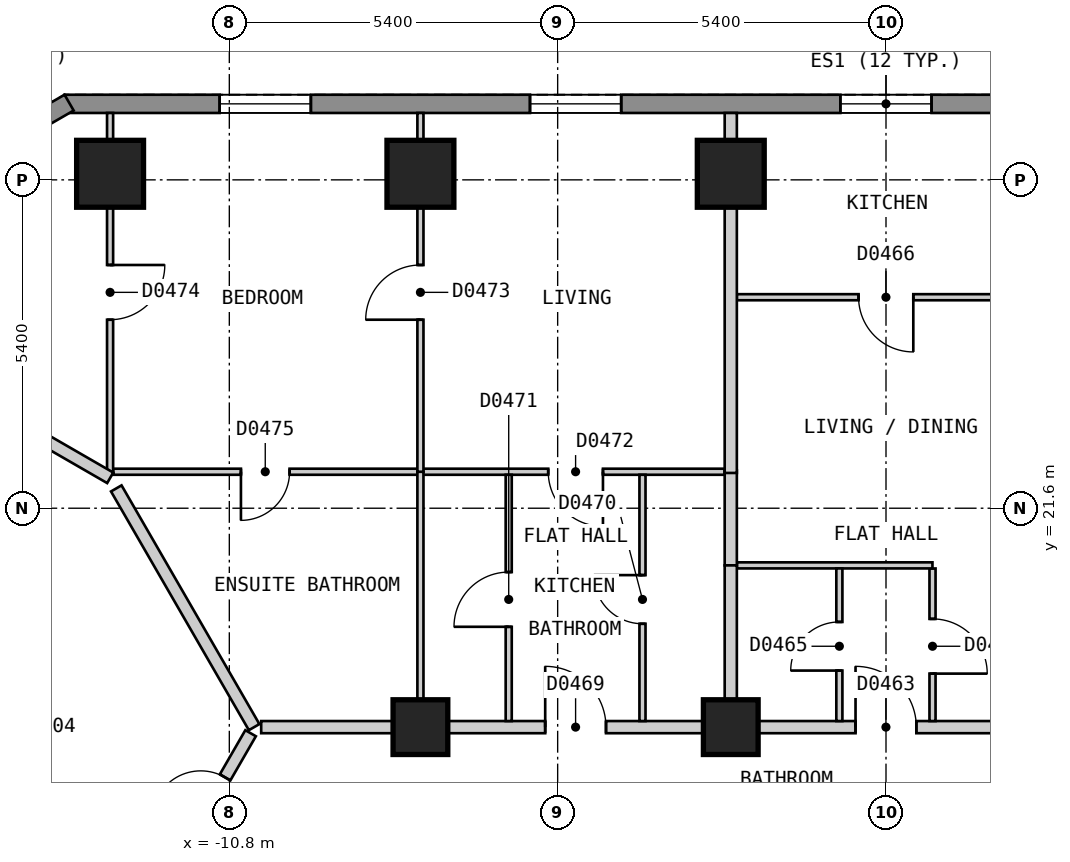
"""IFC4 building model, lengths in metres.
Left out: names, types, materials, properties, quantities, classifications, styles, units other than length and angle.
Written with IfcOpenShell. Run it as: python <this file> out.ifc"""

import sys

from ifc_helpers import new_model, si_unit, direction, frame, frame_2d, origin, origin_2d, place, context, subcontext, project, spatial, polyline, rectangle, outline, extrude, element, fill, save


model = new_model("IFC4")
c1 = context("Model", 3, precision=1e-05, world=origin(), true_north=direction((0.0, 1.0)))
c2 = subcontext(c1, "Body", "Model", "MODEL_VIEW")
j1 = project(units=[si_unit("LENGTHUNIT", "METRE"), si_unit("PLANEANGLEUNIT", "RADIAN")], contexts=[c1])
p1 = place(None, origin())
s1 = spatial("IfcSite", under=j1, at=p1, CompositionType="ELEMENT")
p2 = place(p1, origin())
s2 = spatial("IfcBuilding", under=s1, at=p2, CompositionType="ELEMENT")
p3 = place(p2, frame((0.0, 0.0, 32.4)))
s3 = spatial("IfcBuildingStorey", under=s2, at=p3, CompositionType="ELEMENT", Elevation=32.4)
for number, where, z_axis, x_axis in (
    (1, (-2.553, 27.1, 0.0), (0.0, 0.0, 1.0), (-1.0, 0.0, 0.0)),
    (2, (-7.657, 27.1, 0.0), (0.0, 0.0, 1.0), (-1.0, 0.0, 0.0)),
    (3, (-12.761, 27.1, 0.0), (0.0, 0.0, 1.0), (-1.0, 0.0, 0.0)),
):
    element("IfcColumn", number, at=place(p3, frame(where, z_axis=z_axis, x_axis=x_axis)), inside=s3, PredefinedType="COLUMN", context=c2, shape_type="SweptSolid", body=[
        extrude(rectangle(XDim=1.1, YDim=1.1, at=origin_2d()), origin(), (0.0, 0.0, 1.0), 3.0),
    ])
for number, where, z_axis, x_axis in (
    (4, (-2.553, 18.0, 0.0), (0.0, 0.0, 1.0), (-1.0, 0.0, 0.0)),
    (5, (-7.657, 18.0, 0.0), (0.0, 0.0, 1.0), (-1.0, 0.0, 0.0)),
):
    element("IfcColumn", number, at=place(p3, frame(where, z_axis=z_axis, x_axis=x_axis)), inside=s3, PredefinedType="COLUMN", context=c2, shape_type="SweptSolid", body=[
        extrude(rectangle(XDim=0.9, YDim=0.9, at=origin_2d()), origin(), (0.0, 0.0, 1.0), 3.0),
    ])
p4 = place(p3, frame((13.51, 28.25, 0.0), z_axis=(0.0, 0.0, 1.0), x_axis=(-1.0, 0.0, 0.0)))
e6 = element("IfcWall", 6, at=p4, inside=s3, PredefinedType="SOLIDWALL", context=c2, shape_type="SweptSolid", body=[
    extrude(outline(polyline([(0.0, -0.15), (27.02, -0.15), (26.94, 0.15), (0.08, 0.15), (0.0, -0.15)])), origin(), (0.0, 0.0, 1.0), 2.7),
])
p5 = place(p4, frame((2.553, 0.0, 0.15)))
e7 = element("IfcOpeningElement", 7, at=p5, cuts=e6, PredefinedType="OPENING", context=c2, shape_type="SweptSolid", body=[
    extrude(rectangle(XDim=1.5, YDim=2.1, at=frame_2d((0.75, 1.05))), frame((0.0, 0.16, 0.0), z_axis=(0.0, -1.0, 0.0), x_axis=(1.0, 0.0, 0.0)), (0.0, 0.0, 1.0), 0.32),
])
p6 = place(p4, frame((7.657, 0.0, 0.15)))
e8 = element("IfcOpeningElement", 8, at=p6, cuts=e6, PredefinedType="OPENING", context=c2, shape_type="SweptSolid", body=[
    extrude(rectangle(XDim=1.5, YDim=2.1, at=frame_2d((0.75, 1.05))), frame((0.0, 0.16, 0.0), z_axis=(0.0, -1.0, 0.0), x_axis=(1.0, 0.0, 0.0)), (0.0, 0.0, 1.0), 0.32),
])
p7 = place(p4, frame((12.761, 0.0, 0.15)))
e9 = element("IfcOpeningElement", 9, at=p7, cuts=e6, PredefinedType="OPENING", context=c2, shape_type="SweptSolid", body=[
    extrude(rectangle(XDim=1.5, YDim=2.1, at=frame_2d((0.75, 1.05))), frame((0.0, 0.16, 0.0), z_axis=(0.0, -1.0, 0.0), x_axis=(1.0, 0.0, 0.0)), (0.0, 0.0, 1.0), 0.32),
])
p8 = place(p4, frame((17.865, 0.0, 0.15)))
e10 = element("IfcOpeningElement", 10, at=p8, cuts=e6, PredefinedType="OPENING", context=c2, shape_type="SweptSolid", body=[
    extrude(rectangle(XDim=1.5, YDim=2.1, at=frame_2d((0.75, 1.05))), frame((0.0, 0.16, 0.0), z_axis=(0.0, -1.0, 0.0), x_axis=(1.0, 0.0, 0.0)), (0.0, 0.0, 1.0), 0.32),
])
p9 = place(p4, frame((22.969, 0.0, 0.15)))
e11 = element("IfcOpeningElement", 11, at=p9, cuts=e6, PredefinedType="OPENING", context=c2, shape_type="SweptSolid", body=[
    extrude(rectangle(XDim=1.5, YDim=2.1, at=frame_2d((0.75, 1.05))), frame((0.0, 0.16, 0.0), z_axis=(0.0, -1.0, 0.0), x_axis=(1.0, 0.0, 0.0)), (0.0, 0.0, 1.0), 0.32),
])
p10 = place(p3, frame((-13.435, 28.27, 0.0), z_axis=(0.0, 0.0, 1.0), x_axis=(-0.866010750942, -0.50002537861, 0.0)))
e12 = element("IfcWall", 12, at=p10, inside=s3, PredefinedType="SOLIDWALL", context=c2, shape_type="SweptSolid", body=[
    extrude(outline(polyline([(0.0, -0.15), (5.0, -0.15), (4.919, 0.15), (0.08, 0.15), (0.0, -0.15)])), origin(), (0.0, 0.0, 1.0), 2.7),
])
p11 = place(p10, frame((0.65, 0.0, 0.15)))
e13 = element("IfcOpeningElement", 13, at=p11, cuts=e12, PredefinedType="OPENING", context=c2, shape_type="SweptSolid", body=[
    extrude(rectangle(XDim=1.2, YDim=2.1, at=frame_2d((0.6, 1.05))), frame((0.0, 0.16, 0.0), z_axis=(0.0, -1.0, 0.0), x_axis=(1.0, 0.0, 0.0)), (0.0, 0.0, 1.0), 0.32),
])
p12 = place(p3, frame((-10.276, 18.0, 0.0), z_axis=(0.0, 0.0, 1.0), x_axis=(1.0, 0.0, 0.0)))
e14 = element("IfcWall", 14, at=p12, inside=s3, PredefinedType="PARTITIONING", context=c2, shape_type="SweptSolid", body=[
    extrude(rectangle(XDim=20.5, YDim=0.2, at=frame_2d((10.25, 0.0))), origin(), (0.0, 0.0, 1.0), 2.7),
])
p13 = place(p12, frame((19.265, 0.0, 0.0)))
e15 = element("IfcOpeningElement", 15, at=p13, cuts=e14, PredefinedType="OPENING", context=c2, shape_type="SweptSolid", body=[
    extrude(rectangle(XDim=1.0, YDim=2.1, at=frame_2d((0.5, 1.05))), frame((0.0, 0.11, 0.0), z_axis=(0.0, -1.0, 0.0), x_axis=(1.0, 0.0, 0.0)), (0.0, 0.0, 1.0), 0.22),
])
p14 = place(p12, frame((9.775, 0.0, 0.0)))
e16 = element("IfcOpeningElement", 16, at=p14, cuts=e14, PredefinedType="OPENING", context=c2, shape_type="SweptSolid", body=[
    extrude(rectangle(XDim=1.0, YDim=2.1, at=frame_2d((0.5, 1.05))), frame((0.0, 0.11, 0.0), z_axis=(0.0, -1.0, 0.0), x_axis=(1.0, 0.0, 0.0)), (0.0, 0.0, 1.0), 0.22),
])
p15 = place(p12, frame((4.671, 0.0, 0.0)))
e17 = element("IfcOpeningElement", 17, at=p15, cuts=e14, PredefinedType="OPENING", context=c2, shape_type="SweptSolid", body=[
    extrude(rectangle(XDim=1.0, YDim=2.1, at=frame_2d((0.5, 1.05))), frame((0.0, 0.11, 0.0), z_axis=(0.0, -1.0, 0.0), x_axis=(1.0, 0.0, 0.0)), (0.0, 0.0, 1.0), 0.22),
])
p16 = place(p3, frame((-20.727, 0.099, 0.0), z_axis=(0.0, 0.0, 1.0), x_axis=(0.499993204491, 0.866029327138, 0.0)))
e18 = element("IfcWall", 18, at=p16, inside=s3, PredefinedType="PARTITIONING", context=c2, shape_type="SweptSolid", body=[
    extrude(rectangle(XDim=20.554, YDim=0.2, at=frame_2d((10.277, 0.0))), origin(), (0.0, 0.0, 1.0), 2.7),
])
p17 = place(p16, frame((18.916, 0.0, 0.0)))
e19 = element("IfcOpeningElement", 19, at=p17, cuts=e18, PredefinedType="OPENING", context=c2, shape_type="SweptSolid", body=[
    extrude(rectangle(XDim=0.8, YDim=2.1, at=frame_2d((0.4, 1.05))), frame((0.0, 0.11, 0.0), z_axis=(0.0, -1.0, 0.0), x_axis=(1.0, 0.0, 0.0)), (0.0, 0.0, 1.0), 0.22),
])
p18 = place(p16, frame((14.88, 0.0, 0.0)))
e20 = element("IfcOpeningElement", 20, at=p18, cuts=e18, PredefinedType="OPENING", context=c2, shape_type="SweptSolid", body=[
    extrude(rectangle(XDim=1.0, YDim=2.1, at=frame_2d((0.5, 1.05))), frame((0.0, 0.11, 0.0), z_axis=(0.0, -1.0, 0.0), x_axis=(1.0, 0.0, 0.0)), (0.0, 0.0, 1.0), 0.22),
])
p19 = place(p16, frame((9.776, 0.0, 0.0)))
e21 = element("IfcOpeningElement", 21, at=p19, cuts=e18, PredefinedType="OPENING", context=c2, shape_type="SweptSolid", body=[
    extrude(rectangle(XDim=1.0, YDim=2.1, at=frame_2d((0.5, 1.05))), frame((0.0, 0.11, 0.0), z_axis=(0.0, -1.0, 0.0), x_axis=(1.0, 0.0, 0.0)), (0.0, 0.0, 1.0), 0.22),
])
p20 = place(p16, frame((4.673, 0.0, 0.0)))
e22 = element("IfcOpeningElement", 22, at=p20, cuts=e18, PredefinedType="OPENING", context=c2, shape_type="SweptSolid", body=[
    extrude(rectangle(XDim=1.0, YDim=2.1, at=frame_2d((0.5, 1.05))), frame((0.0, 0.11, 0.0), z_axis=(0.0, -1.0, 0.0), x_axis=(1.0, 0.0, 0.0)), (0.0, 0.0, 1.0), 0.22),
])
p21 = place(p16, frame((0.838, 0.0, 0.0)))
e23 = element("IfcOpeningElement", 23, at=p21, cuts=e18, PredefinedType="OPENING", context=c2, shape_type="SweptSolid", body=[
    extrude(rectangle(XDim=0.8, YDim=2.1, at=frame_2d((0.4, 1.05))), frame((0.0, 0.11, 0.0), z_axis=(0.0, -1.0, 0.0), x_axis=(1.0, 0.0, 0.0)), (0.0, 0.0, 1.0), 0.22),
])
p22 = place(p3, frame((0.765, 20.609, 0.0), z_axis=(0.0, 0.0, 1.0), x_axis=(0.0, -1.0, 0.0)))
e24 = element("IfcWall", 24, at=p22, inside=s3, PredefinedType="PARTITIONING", context=c2, shape_type="SweptSolid", body=[
    extrude(rectangle(XDim=2.509, YDim=0.1, at=frame_2d((1.254, 0.0))), origin(), (0.0, 0.0, 1.0), 2.7),
])
p23 = place(p22, frame((0.829, 0.0, 0.0)))
e25 = element("IfcOpeningElement", 25, at=p23, cuts=e24, PredefinedType="OPENING", context=c2, shape_type="SweptSolid", body=[
    extrude(rectangle(XDim=0.9, YDim=2.1, at=frame_2d((0.45, 1.05))), frame((0.0, 0.06, 0.0), z_axis=(0.0, -1.0, 0.0), x_axis=(1.0, 0.0, 0.0)), (0.0, 0.0, 1.0), 0.12),
])
p24 = place(p3, frame((-2.453, 20.66, 0.0), z_axis=(0.0, 0.0, 1.0), x_axis=(1.0, 0.0, 0.0)))
e26 = element("IfcWall", 26, at=p24, inside=s3, PredefinedType="PARTITIONING", context=c2, shape_type="SweptSolid", body=[
    extrude(rectangle(XDim=3.217, YDim=0.1, at=frame_2d((1.608, 0.0))), origin(), (0.0, 0.0, 1.0), 2.7),
])
p25 = place(p3, frame((-12.711, 22.2, 0.0), z_axis=(0.0, 0.0, 1.0), x_axis=(1.0, 0.0, 0.0)))
e27 = element("IfcWall", 27, at=p25, inside=s3, PredefinedType="PARTITIONING", context=c2, shape_type="SweptSolid", body=[
    extrude(rectangle(XDim=10.058, YDim=0.1, at=frame_2d((5.029, 0.0))), origin(), (0.0, 0.0, 1.0), 2.7),
])
p26 = place(p25, frame((7.156, 0.0, 0.0)))
e28 = element("IfcOpeningElement", 28, at=p26, cuts=e27, PredefinedType="OPENING", context=c2, shape_type="SweptSolid", body=[
    extrude(rectangle(XDim=0.9, YDim=2.1, at=frame_2d((0.45, 1.05))), frame((0.0, 0.06, 0.0), z_axis=(0.0, -1.0, 0.0), x_axis=(1.0, 0.0, 0.0)), (0.0, 0.0, 1.0), 0.12),
])
p27 = place(p25, frame((2.102, 0.0, 0.0)))
e29 = element("IfcOpeningElement", 29, at=p27, cuts=e27, PredefinedType="OPENING", context=c2, shape_type="SweptSolid", body=[
    extrude(rectangle(XDim=0.8, YDim=2.1, at=frame_2d((0.4, 1.05))), frame((0.0, 0.06, 0.0), z_axis=(0.0, -1.0, 0.0), x_axis=(1.0, 0.0, 0.0)), (0.0, 0.0, 1.0), 0.12),
])
p28 = place(p3, frame((-2.453, 25.07, 0.0), z_axis=(0.0, 0.0, 1.0), x_axis=(1.0, 0.0, 0.0)))
e30 = element("IfcWall", 30, at=p28, inside=s3, PredefinedType="PARTITIONING", context=c2, shape_type="SweptSolid", body=[
    extrude(rectangle(XDim=4.954, YDim=0.1, at=frame_2d((2.477, 0.0))), origin(), (0.0, 0.0, 1.0), 2.7),
])
p29 = place(p28, frame((2.002, 0.0, 0.0)))
e31 = element("IfcOpeningElement", 31, at=p29, cuts=e30, PredefinedType="OPENING", context=c2, shape_type="SweptSolid", body=[
    extrude(rectangle(XDim=0.9, YDim=2.1, at=frame_2d((0.45, 1.05))), frame((0.0, 0.06, 0.0), z_axis=(0.0, -1.0, 0.0), x_axis=(1.0, 0.0, 0.0)), (0.0, 0.0, 1.0), 0.12),
])
p30 = place(p3, frame((-4.005, 18.1, 0.0), z_axis=(0.0, 0.0, 1.0), x_axis=(0.0, 1.0, 0.0)))
e32 = element("IfcWall", 32, at=p30, inside=s3, PredefinedType="PARTITIONING", context=c2, shape_type="SweptSolid", body=[
    extrude(rectangle(XDim=4.05, YDim=0.1, at=frame_2d((2.025, 0.0))), origin(), (0.0, 0.0, 1.0), 2.7),
])
p31 = place(p30, frame((1.6, 0.0, 0.0)))
e33 = element("IfcOpeningElement", 33, at=p31, cuts=e32, PredefinedType="OPENING", context=c2, shape_type="SweptSolid", body=[
    extrude(rectangle(XDim=0.8, YDim=2.1, at=frame_2d((0.4, 1.05))), frame((0.0, 0.06, 0.0), z_axis=(0.0, -1.0, 0.0), x_axis=(1.0, 0.0, 0.0)), (0.0, 0.0, 1.0), 0.12),
])
p32 = place(p3, frame((-6.205, 18.1, 0.0), z_axis=(0.0, 0.0, 1.0), x_axis=(0.0, 1.0, 0.0)))
e34 = element("IfcWall", 34, at=p32, inside=s3, PredefinedType="PARTITIONING", context=c2, shape_type="SweptSolid", body=[
    extrude(rectangle(XDim=4.05, YDim=0.1, at=frame_2d((2.025, 0.0))), origin(), (0.0, 0.0, 1.0), 2.7),
])
p33 = place(p32, frame((1.55, 0.0, 0.0)))
e35 = element("IfcOpeningElement", 35, at=p33, cuts=e34, PredefinedType="OPENING", context=c2, shape_type="SweptSolid", body=[
    extrude(rectangle(XDim=0.9, YDim=2.1, at=frame_2d((0.45, 1.05))), frame((0.0, 0.06, 0.0), z_axis=(0.0, -1.0, 0.0), x_axis=(1.0, 0.0, 0.0)), (0.0, 0.0, 1.0), 0.12),
])
p34 = place(p3, frame((-7.657, 18.1, 0.0), z_axis=(0.0, 0.0, 1.0), x_axis=(0.0, 1.0, 0.0)))
e36 = element("IfcWall", 36, at=p34, inside=s3, PredefinedType="PARTITIONING", context=c2, shape_type="SweptSolid", body=[
    extrude(rectangle(XDim=4.1, YDim=0.1, at=frame_2d((2.05, 0.0))), origin(), (0.0, 0.0, 1.0), 2.7),
])
p35 = place(p3, frame((-0.767, 18.1, 0.0), z_axis=(0.0, 0.0, 1.0), x_axis=(0.0, 1.0, 0.0)))
e37 = element("IfcWall", 37, at=p35, inside=s3, PredefinedType="PARTITIONING", context=c2, shape_type="SweptSolid", body=[
    extrude(rectangle(XDim=2.51, YDim=0.1, at=frame_2d((1.255, 0.0))), origin(), (0.0, 0.0, 1.0), 2.7),
])
p36 = place(p35, frame((0.83, 0.0, 0.0)))
e38 = element("IfcOpeningElement", 38, at=p36, cuts=e37, PredefinedType="OPENING", context=c2, shape_type="SweptSolid", body=[
    extrude(rectangle(XDim=0.8, YDim=2.1, at=frame_2d((0.4, 1.05))), frame((0.0, 0.06, 0.0), z_axis=(0.0, -1.0, 0.0), x_axis=(1.0, 0.0, 0.0)), (0.0, 0.0, 1.0), 0.12),
])
p37 = place(p3, frame((-12.761, 22.2, 0.0), z_axis=(0.0, 0.0, 1.0), x_axis=(0.0, 1.0, 0.0)))
e39 = element("IfcWall", 39, at=p37, inside=s3, PredefinedType="PARTITIONING", context=c2, shape_type="SweptSolid", body=[
    extrude(rectangle(XDim=5.9, YDim=0.1, at=frame_2d((2.95, 0.0))), origin(), (0.0, 0.0, 1.0), 2.7),
])
p38 = place(p37, frame((2.5, 0.0, 0.0)))
e40 = element("IfcOpeningElement", 40, at=p38, cuts=e39, PredefinedType="OPENING", context=c2, shape_type="SweptSolid", body=[
    extrude(rectangle(XDim=0.9, YDim=2.1, at=frame_2d((0.45, 1.05))), frame((0.0, 0.06, 0.0), z_axis=(0.0, -1.0, 0.0), x_axis=(1.0, 0.0, 0.0)), (0.0, 0.0, 1.0), 0.12),
])
p39 = place(p3, frame((-12.659, 21.926, 0.0), z_axis=(0.0, 0.0, 1.0), x_axis=(0.500025458316, -0.86601070492, 0.0)))
e41 = element("IfcWall", 41, at=p39, inside=s3, PredefinedType="PARTITIONING", context=c2, shape_type="SweptSolid", body=[
    extrude(rectangle(XDim=4.533, YDim=0.2, at=frame_2d((2.267, 0.0))), origin(), (0.0, 0.0, 1.0), 2.7),
])
p40 = place(p3, frame((-2.553, 22.22, 0.0), z_axis=(0.0, 0.0, 1.0), x_axis=(0.0, -1.0, 0.0)))
e42 = element("IfcWall", 42, at=p40, inside=s3, PredefinedType="PARTITIONING", context=c2, shape_type="SweptSolid", body=[
    extrude(rectangle(XDim=1.56, YDim=0.2, at=frame_2d((0.78, 0.0))), origin(), (0.0, 0.0, 1.0), 2.7),
])
p41 = place(p3, frame((-20.508, 20.679, 0.0), z_axis=(0.0, 0.0, 1.0), x_axis=(0.866047370643, -0.499961950354, 0.0)))
e43 = element("IfcWall", 43, at=p41, inside=s3, PredefinedType="PARTITIONING", context=c2, shape_type="SweptSolid", body=[
    extrude(rectangle(XDim=10.001, YDim=0.2, at=frame_2d((5.0, 0.0))), origin(), (0.0, 0.0, 1.0), 2.7),
])
p42 = place(p3, frame((-17.955, 25.099, 0.0), z_axis=(0.0, 0.0, 1.0), x_axis=(0.86609140076, -0.499885672459, 0.0)))
e44 = element("IfcWall", 44, at=p42, inside=s3, PredefinedType="PARTITIONING", context=c2, shape_type="SweptSolid", body=[
    extrude(rectangle(XDim=6.0, YDim=0.2, at=frame_2d((3.0, 0.0))), origin(), (0.0, 0.0, 1.0), 2.7),
])
p43 = place(p3, frame((-2.553, 18.1, 0.0), z_axis=(0.0, 0.0, 1.0), x_axis=(0.0, 1.0, 0.0)))
e45 = element("IfcWall", 45, at=p43, inside=s3, PredefinedType="PARTITIONING", context=c2, shape_type="SweptSolid", body=[
    extrude(rectangle(XDim=2.56, YDim=0.2, at=frame_2d((1.28, 0.0))), origin(), (0.0, 0.0, 1.0), 2.7),
])
p44 = place(p3, frame((-2.553, 22.18, 0.0), z_axis=(0.0, 0.0, 1.0), x_axis=(0.0, 1.0, 0.0)))
e46 = element("IfcWall", 46, at=p44, inside=s3, PredefinedType="PARTITIONING", context=c2, shape_type="SweptSolid", body=[
    extrude(rectangle(XDim=5.92, YDim=0.2, at=frame_2d((2.96, 0.0))), origin(), (0.0, 0.0, 1.0), 2.7),
])
p45 = place(p3, frame((-7.657, 22.2, 0.0), z_axis=(0.0, 0.0, 1.0), x_axis=(0.0, 1.0, 0.0)))
e47 = element("IfcWall", 47, at=p45, inside=s3, PredefinedType="PARTITIONING", context=c2, shape_type="SweptSolid", body=[
    extrude(rectangle(XDim=5.9, YDim=0.1, at=frame_2d((2.95, 0.0))), origin(), (0.0, 0.0, 1.0), 2.7),
])
p46 = place(p45, frame((2.5, 0.0, 0.0)))
e48 = element("IfcOpeningElement", 48, at=p46, cuts=e47, PredefinedType="OPENING", context=c2, shape_type="SweptSolid", body=[
    extrude(rectangle(XDim=0.9, YDim=2.1, at=frame_2d((0.45, 1.05))), frame((0.0, 0.06, 0.0), z_axis=(0.0, -1.0, 0.0), x_axis=(1.0, 0.0, 0.0)), (0.0, 0.0, 1.0), 0.12),
])
p47 = place(p7, origin())
e49 = element("IfcWindow", 49, at=p47, inside=s3, PartitioningType="SINGLE_PANEL", PredefinedType="WINDOW", context=c2, shape_type="SweptSolid", body=[
    extrude(rectangle(XDim=1.5, YDim=2.1, at=frame_2d((0.75, 1.05))), frame((0.0, 0.03, 0.0), z_axis=(0.0, -1.0, 0.0), x_axis=(1.0, 0.0, 0.0)), (0.0, 0.0, 1.0), 0.06),
])
fill(e9, e49)
p48 = place(p8, origin())
e50 = element("IfcWindow", 50, at=p48, inside=s3, PartitioningType="SINGLE_PANEL", PredefinedType="WINDOW", context=c2, shape_type="SweptSolid", body=[
    extrude(rectangle(XDim=1.5, YDim=2.1, at=frame_2d((0.75, 1.05))), frame((0.0, 0.03, 0.0), z_axis=(0.0, -1.0, 0.0), x_axis=(1.0, 0.0, 0.0)), (0.0, 0.0, 1.0), 0.06),
])
fill(e10, e50)
p49 = place(p9, origin())
e51 = element("IfcWindow", 51, at=p49, inside=s3, PartitioningType="SINGLE_PANEL", PredefinedType="WINDOW", context=c2, shape_type="SweptSolid", body=[
    extrude(rectangle(XDim=1.5, YDim=2.1, at=frame_2d((0.75, 1.05))), frame((0.0, 0.03, 0.0), z_axis=(0.0, -1.0, 0.0), x_axis=(1.0, 0.0, 0.0)), (0.0, 0.0, 1.0), 0.06),
])
fill(e11, e51)
p50 = place(p17, origin())
e52 = element("IfcDoor", 52, at=p50, inside=s3, OperationType="SINGLE_SWING_LEFT", PredefinedType="DOOR", context=c2, shape_type="SweptSolid", body=[
    extrude(rectangle(XDim=0.8, YDim=2.1, at=frame_2d((0.4, 1.05))), frame((0.0, 0.025, 0.0), z_axis=(0.0, -1.0, 0.0), x_axis=(1.0, 0.0, 0.0)), (0.0, 0.0, 1.0), 0.05),
])
fill(e19, e52)
p51 = place(p14, origin())
e53 = element("IfcDoor", 53, at=p51, inside=s3, OperationType="SINGLE_SWING_LEFT", PredefinedType="DOOR", context=c2, shape_type="SweptSolid", body=[
    extrude(rectangle(XDim=1.0, YDim=2.1, at=frame_2d((0.5, 1.05))), frame((0.0, 0.025, 0.0), z_axis=(0.0, -1.0, 0.0), x_axis=(1.0, 0.0, 0.0)), (0.0, 0.0, 1.0), 0.05),
])
fill(e16, e53)
p52 = place(p23, origin())
e54 = element("IfcDoor", 54, at=p52, inside=s3, OperationType="SINGLE_SWING_RIGHT", PredefinedType="DOOR", context=c2, shape_type="SweptSolid", body=[
    extrude(rectangle(XDim=0.9, YDim=2.1, at=frame_2d((0.45, 1.05))), frame((0.0, 0.025, 0.0), z_axis=(0.0, -1.0, 0.0), x_axis=(1.0, 0.0, 0.0)), (0.0, 0.0, 1.0), 0.05),
])
fill(e25, e54)
p53 = place(p36, origin())
e55 = element("IfcDoor", 55, at=p53, inside=s3, OperationType="SINGLE_SWING_LEFT", PredefinedType="DOOR", context=c2, shape_type="SweptSolid", body=[
    extrude(rectangle(XDim=0.8, YDim=2.1, at=frame_2d((0.4, 1.05))), frame((0.0, 0.025, 0.0), z_axis=(0.0, -1.0, 0.0), x_axis=(1.0, 0.0, 0.0)), (0.0, 0.0, 1.0), 0.05),
])
fill(e38, e55)
p54 = place(p29, origin())
e56 = element("IfcDoor", 56, at=p54, inside=s3, OperationType="SINGLE_SWING_RIGHT", PredefinedType="DOOR", context=c2, shape_type="SweptSolid", body=[
    extrude(rectangle(XDim=0.9, YDim=2.1, at=frame_2d((0.45, 1.05))), frame((0.0, 0.025, 0.0), z_axis=(0.0, -1.0, 0.0), x_axis=(1.0, 0.0, 0.0)), (0.0, 0.0, 1.0), 0.05),
])
fill(e31, e56)
p55 = place(p15, origin())
e57 = element("IfcDoor", 57, at=p55, inside=s3, OperationType="SINGLE_SWING_LEFT", PredefinedType="DOOR", context=c2, shape_type="SweptSolid", body=[
    extrude(rectangle(XDim=1.0, YDim=2.1, at=frame_2d((0.5, 1.05))), frame((0.0, 0.025, 0.0), z_axis=(0.0, -1.0, 0.0), x_axis=(1.0, 0.0, 0.0)), (0.0, 0.0, 1.0), 0.05),
])
fill(e17, e57)
p56 = place(p31, origin())
e58 = element("IfcDoor", 58, at=p56, inside=s3, OperationType="SINGLE_SWING_RIGHT", PredefinedType="DOOR", context=c2, shape_type="SweptSolid", body=[
    extrude(rectangle(XDim=0.8, YDim=2.1, at=frame_2d((0.4, 1.05))), frame((0.0, 0.025, 0.0), z_axis=(0.0, -1.0, 0.0), x_axis=(1.0, 0.0, 0.0)), (0.0, 0.0, 1.0), 0.05),
])
fill(e33, e58)
p57 = place(p33, origin())
e59 = element("IfcDoor", 59, at=p57, inside=s3, OperationType="SINGLE_SWING_LEFT", PredefinedType="DOOR", context=c2, shape_type="SweptSolid", body=[
    extrude(rectangle(XDim=0.9, YDim=2.1, at=frame_2d((0.45, 1.05))), frame((0.0, 0.025, 0.0), z_axis=(0.0, -1.0, 0.0), x_axis=(1.0, 0.0, 0.0)), (0.0, 0.0, 1.0), 0.05),
])
fill(e35, e59)
p58 = place(p26, origin())
e60 = element("IfcDoor", 60, at=p58, inside=s3, OperationType="SINGLE_SWING_RIGHT", PredefinedType="DOOR", context=c2, shape_type="SweptSolid", body=[
    extrude(rectangle(XDim=0.9, YDim=2.1, at=frame_2d((0.45, 1.05))), frame((0.0, 0.025, 0.0), z_axis=(0.0, -1.0, 0.0), x_axis=(1.0, 0.0, 0.0)), (0.0, 0.0, 1.0), 0.05),
])
fill(e28, e60)
p59 = place(p46, origin())
e61 = element("IfcDoor", 61, at=p59, inside=s3, OperationType="SINGLE_SWING_LEFT", PredefinedType="DOOR", context=c2, shape_type="SweptSolid", body=[
    extrude(rectangle(XDim=0.9, YDim=2.1, at=frame_2d((0.45, 1.05))), frame((0.0, 0.025, 0.0), z_axis=(0.0, -1.0, 0.0), x_axis=(1.0, 0.0, 0.0)), (0.0, 0.0, 1.0), 0.05),
])
fill(e48, e61)
p60 = place(p38, origin())
e62 = element("IfcDoor", 62, at=p60, inside=s3, OperationType="SINGLE_SWING_RIGHT", PredefinedType="DOOR", context=c2, shape_type="SweptSolid", body=[
    extrude(rectangle(XDim=0.9, YDim=2.1, at=frame_2d((0.45, 1.05))), frame((0.0, 0.025, 0.0), z_axis=(0.0, -1.0, 0.0), x_axis=(1.0, 0.0, 0.0)), (0.0, 0.0, 1.0), 0.05),
])
fill(e40, e62)
p61 = place(p27, origin())
e63 = element("IfcDoor", 63, at=p61, inside=s3, OperationType="SINGLE_SWING_LEFT", PredefinedType="DOOR", context=c2, shape_type="SweptSolid", body=[
    extrude(rectangle(XDim=0.8, YDim=2.1, at=frame_2d((0.4, 1.05))), frame((0.0, 0.025, 0.0), z_axis=(0.0, -1.0, 0.0), x_axis=(1.0, 0.0, 0.0)), (0.0, 0.0, 1.0), 0.05),
])
fill(e29, e63)
save(model, sys.argv[1])
